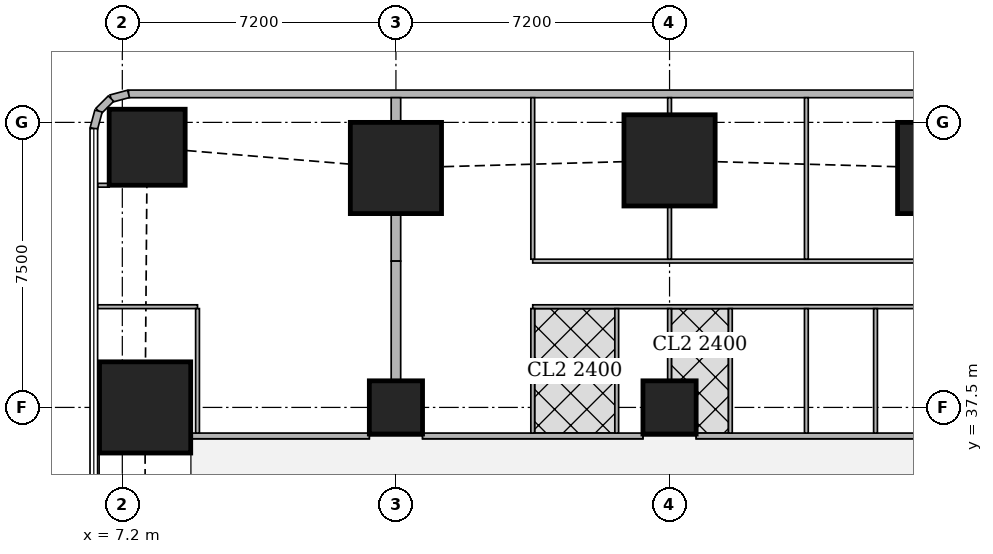
"""IFC4 building model, lengths in metres.
Left out: names, types, materials, properties, quantities, classifications, styles, units other than length and angle.
Written with IfcOpenShell. Run it as: python <this file> out.ifc"""

import sys

from ifc_helpers import new_model, si_unit, direction, frame, frame_2d, origin, origin_2d, place, context, subcontext, project, spatial, rectangle, extrude, element, fill, save


model = new_model("IFC4")
c1 = context("Model", 3, precision=1e-05, world=origin(), true_north=direction((0.0, 1.0)))
c2 = subcontext(c1, "Body", "Model", "MODEL_VIEW")
j1 = project(units=[si_unit("LENGTHUNIT", "METRE"), si_unit("PLANEANGLEUNIT", "RADIAN")], contexts=[c1])
p1 = place(None, origin())
s1 = spatial("IfcSite", under=j1, at=p1, CompositionType="ELEMENT")
p2 = place(p1, origin())
s2 = spatial("IfcBuilding", under=s1, at=p2, CompositionType="ELEMENT")
p3 = place(p2, frame((0.0, 0.0, 193.7)))
s3 = spatial("IfcBuildingStorey", under=s2, at=p3, CompositionType="ELEMENT", Elevation=193.7)
p4 = place(p3, frame((7.8, 37.5, 0.0), z_axis=(0.0, 0.0, 1.0), x_axis=(1.0, 0.0, 0.0)))
e1 = element("IfcColumn", 1, at=p4, inside=s3, PredefinedType="COLUMN", context=c2, shape_type="SweptSolid", body=[
    extrude(rectangle(XDim=2.4, YDim=2.4, at=origin_2d()), origin(), (0.0, 0.0, 1.0), 3.75),
])
for number, where, z_axis, x_axis in (
    (2, (14.4, 37.5, 0.0), (0.0, 0.0, 1.0), (1.0, 0.0, 0.0)),
    (3, (21.6, 37.5, 0.0), (0.0, 0.0, 1.0), (1.0, 0.0, 0.0)),
):
    element("IfcColumn", number, at=place(p3, frame(where, z_axis=z_axis, x_axis=x_axis)), inside=s3, PredefinedType="COLUMN", context=c2, shape_type="SweptSolid", body=[
        extrude(rectangle(XDim=1.4, YDim=1.4, at=origin_2d()), origin(), (0.0, 0.0, 1.0), 3.75),
    ])
p5 = place(p3, frame((7.854, 44.346, 0.0), z_axis=(0.0, 0.0, 1.0), x_axis=(1.0, 0.0, 0.0)))
e4 = element("IfcColumn", 4, at=p5, inside=s3, PredefinedType="COLUMN", context=c2, shape_type="SweptSolid", body=[
    extrude(rectangle(XDim=2.0, YDim=2.0, at=origin_2d()), origin(), (0.0, 0.0, 1.0), 3.75),
])
for number, where, z_axis, x_axis in (
    (5, (14.4, 43.8, 0.0), (0.0, 0.0, 1.0), (1.0, 0.0, 0.0)),
    (6, (21.6, 44.0, 0.0), (0.0, 0.0, 1.0), (1.0, 0.0, 0.0)),
    (7, (28.8, 43.8, 0.0), (0.0, 0.0, 1.0), (1.0, 0.0, 0.0)),
):
    element("IfcColumn", number, at=place(p3, frame(where, z_axis=z_axis, x_axis=x_axis)), inside=s3, PredefinedType="COLUMN", context=c2, shape_type="SweptSolid", body=[
        extrude(rectangle(XDim=2.4, YDim=2.4, at=origin_2d()), origin(), (0.0, 0.0, 1.0), 3.75),
    ])
p6 = place(p3, frame((40.106, 45.75, 0.0), z_axis=(0.0, 0.0, 1.0), x_axis=(-1.0, 0.0, 0.0)))
e8 = element("IfcWall", 8, at=p6, inside=s3, PredefinedType="SOLIDWALL", context=c2, shape_type="SweptSolid", body=[
    extrude(rectangle(XDim=32.743, YDim=0.2, at=frame_2d((16.372, 0.0))), origin(), (0.0, 0.0, 1.0), 3.5),
])
p7 = place(p6, frame((8.606, 0.0, 0.9)))
e9 = element("IfcOpeningElement", 9, at=p7, cuts=e8, PredefinedType="OPENING", context=c2, shape_type="SweptSolid", body=[
    extrude(rectangle(XDim=1.8, YDim=1.5, at=frame_2d((0.9, 0.75))), frame((0.0, 0.11, 0.0), z_axis=(0.0, -1.0, 0.0), x_axis=(1.0, 0.0, 0.0)), (0.0, 0.0, 1.0), 0.22),
])
p8 = place(p6, frame((12.206, 0.0, 0.9)))
e10 = element("IfcOpeningElement", 10, at=p8, cuts=e8, PredefinedType="OPENING", context=c2, shape_type="SweptSolid", body=[
    extrude(rectangle(XDim=1.8, YDim=1.5, at=frame_2d((0.9, 0.75))), frame((0.0, 0.11, 0.0), z_axis=(0.0, -1.0, 0.0), x_axis=(1.0, 0.0, 0.0)), (0.0, 0.0, 1.0), 0.22),
])
p9 = place(p6, frame((15.806, 0.0, 0.9)))
e11 = element("IfcOpeningElement", 11, at=p9, cuts=e8, PredefinedType="OPENING", context=c2, shape_type="SweptSolid", body=[
    extrude(rectangle(XDim=1.8, YDim=1.5, at=frame_2d((0.9, 0.75))), frame((0.0, 0.11, 0.0), z_axis=(0.0, -1.0, 0.0), x_axis=(1.0, 0.0, 0.0)), (0.0, 0.0, 1.0), 0.22),
])
p10 = place(p6, frame((19.406, 0.0, 0.9)))
e12 = element("IfcOpeningElement", 12, at=p10, cuts=e8, PredefinedType="OPENING", context=c2, shape_type="SweptSolid", body=[
    extrude(rectangle(XDim=1.8, YDim=1.5, at=frame_2d((0.9, 0.75))), frame((0.0, 0.11, 0.0), z_axis=(0.0, -1.0, 0.0), x_axis=(1.0, 0.0, 0.0)), (0.0, 0.0, 1.0), 0.22),
])
p11 = place(p6, frame((23.006, 0.0, 0.9)))
e13 = element("IfcOpeningElement", 13, at=p11, cuts=e8, PredefinedType="OPENING", context=c2, shape_type="SweptSolid", body=[
    extrude(rectangle(XDim=1.8, YDim=1.5, at=frame_2d((0.9, 0.75))), frame((0.0, 0.11, 0.0), z_axis=(0.0, -1.0, 0.0), x_axis=(1.0, 0.0, 0.0)), (0.0, 0.0, 1.0), 0.22),
])
p12 = place(p6, frame((28.025, 0.0, 0.9)))
e14 = element("IfcOpeningElement", 14, at=p12, cuts=e8, PredefinedType="OPENING", context=c2, shape_type="SweptSolid", body=[
    extrude(rectangle(XDim=2.4, YDim=1.5, at=frame_2d((1.2, 0.75))), frame((0.0, 0.11, 0.0), z_axis=(0.0, -1.0, 0.0), x_axis=(1.0, 0.0, 0.0)), (0.0, 0.0, 1.0), 0.22),
])
p13 = place(p3, frame((7.363, 45.75, 0.0), z_axis=(0.0, 0.0, 1.0), x_axis=(-0.965655254015, -0.259826731483, 0.0)))
e15 = element("IfcWall", 15, at=p13, inside=s3, PredefinedType="SOLIDWALL", context=c2, shape_type="SweptSolid", body=[
    extrude(rectangle(XDim=0.477, YDim=0.2, at=frame_2d((0.239, 0.0))), origin(), (0.0, 0.0, 1.0), 3.5),
])
p14 = place(p3, frame((6.902, 45.626, 0.0), z_axis=(0.0, 0.0, 1.0), x_axis=(-0.707369890659, -0.706843573776, 0.0)))
e16 = element("IfcWall", 16, at=p14, inside=s3, PredefinedType="SOLIDWALL", context=c2, shape_type="SweptSolid", body=[
    extrude(rectangle(XDim=0.464, YDim=0.2, at=frame_2d((0.232, 0.0))), origin(), (0.0, 0.0, 1.0), 3.5),
])
p15 = place(p3, frame((6.574, 45.298, 0.0), z_axis=(0.0, 0.0, 1.0), x_axis=(-0.259698463175, -0.965689757751, 0.0)))
e17 = element("IfcWall", 17, at=p15, inside=s3, PredefinedType="SOLIDWALL", context=c2, shape_type="SweptSolid", body=[
    extrude(rectangle(XDim=0.478, YDim=0.2, at=frame_2d((0.239, 0.0))), origin(), (0.0, 0.0, 1.0), 3.5),
])
p16 = place(p3, frame((9.001, 36.75, 0.0), z_axis=(0.0, 0.0, 1.0), x_axis=(1.0, 0.0, 0.0)))
e18 = element("IfcWall", 18, at=p16, inside=s3, PredefinedType="SOLIDWALL", context=c2, shape_type="SweptSolid", body=[
    extrude(rectangle(XDim=4.698, YDim=0.15, at=frame_2d((2.349, 0.0))), origin(), (0.0, 0.0, 1.0), 3.5),
])
p17 = place(p16, frame((0.353, 0.0, 0.0)))
e19 = element("IfcOpeningElement", 19, at=p17, cuts=e18, PredefinedType="OPENING", context=c2, shape_type="SweptSolid", body=[
    extrude(rectangle(XDim=1.0, YDim=2.1, at=frame_2d((0.5, 1.05))), frame((0.0, 0.085, 0.0), z_axis=(0.0, -1.0, 0.0), x_axis=(1.0, 0.0, 0.0)), (0.0, 0.0, 1.0), 0.17),
])
p18 = place(p3, frame((15.101, 36.75, 0.0), z_axis=(0.0, 0.0, 1.0), x_axis=(1.0, 0.0, 0.0)))
e20 = element("IfcWall", 20, at=p18, inside=s3, PredefinedType="SOLIDWALL", context=c2, shape_type="SweptSolid", body=[
    extrude(rectangle(XDim=5.798, YDim=0.15, at=frame_2d((2.899, 0.0))), origin(), (0.0, 0.0, 1.0), 3.5),
])
p19 = place(p18, frame((0.799, 0.0, 0.0)))
e21 = element("IfcOpeningElement", 21, at=p19, cuts=e20, PredefinedType="OPENING", context=c2, shape_type="SweptSolid", body=[
    extrude(rectangle(XDim=1.0, YDim=2.1, at=frame_2d((0.5, 1.05))), frame((0.0, 0.085, 0.0), z_axis=(0.0, -1.0, 0.0), x_axis=(1.0, 0.0, 0.0)), (0.0, 0.0, 1.0), 0.17),
])
p20 = place(p3, frame((22.301, 36.75, 0.0), z_axis=(0.0, 0.0, 1.0), x_axis=(1.0, 0.0, 0.0)))
e22 = element("IfcWall", 22, at=p20, inside=s3, PredefinedType="SOLIDWALL", context=c2, shape_type="SweptSolid", body=[
    extrude(rectangle(XDim=5.798, YDim=0.15, at=frame_2d((2.899, 0.0))), origin(), (0.0, 0.0, 1.0), 3.5),
])
p21 = place(p3, frame((6.854, 43.346, 0.0), z_axis=(0.0, 0.0, 1.0), x_axis=(-1.0, 0.0, 0.0)))
e23 = element("IfcWall", 23, at=p21, inside=s3, PredefinedType="PARTITIONING", context=c2, shape_type="SweptSolid", body=[
    extrude(rectangle(XDim=0.304, YDim=0.1, at=frame_2d((0.152, 0.0))), origin(), (0.0, 0.0, 1.0), 2.05),
])
p22 = place(p3, frame((6.55, 40.15, 0.0), z_axis=(0.0, 0.0, 1.0), x_axis=(1.0, 0.0, 0.0)))
e24 = element("IfcWall", 24, at=p22, inside=s3, PredefinedType="PARTITIONING", context=c2, shape_type="SweptSolid", body=[
    extrude(rectangle(XDim=2.629, YDim=0.1, at=frame_2d((1.314, 0.0))), origin(), (0.0, 0.0, 1.0), 2.05),
])
p23 = place(p3, frame((9.179, 36.825, 0.0), z_axis=(0.0, 0.0, 1.0), x_axis=(0.0, 1.0, 0.0)))
e25 = element("IfcWall", 25, at=p23, inside=s3, PredefinedType="PARTITIONING", context=c2, shape_type="SweptSolid", body=[
    extrude(rectangle(XDim=3.275, YDim=0.1, at=frame_2d((1.638, 0.0))), origin(), (0.0, 0.0, 1.0), 3.5),
])
p24 = place(p23, frame((2.225, 0.0, 0.0)))
e26 = element("IfcOpeningElement", 26, at=p24, cuts=e25, PredefinedType="OPENING", context=c2, shape_type="SweptSolid", body=[
    extrude(rectangle(XDim=0.9, YDim=2.1, at=frame_2d((0.45, 1.05))), frame((0.0, 0.06, 0.0), z_axis=(0.0, -1.0, 0.0), x_axis=(1.0, 0.0, 0.0)), (0.0, 0.0, 1.0), 0.12),
])
p25 = place(p3, frame((18.0, 41.35, 0.0), z_axis=(0.0, 0.0, 1.0), x_axis=(1.0, 0.0, 0.0)))
e27 = element("IfcWall", 27, at=p25, inside=s3, PredefinedType="PARTITIONING", context=c2, shape_type="SweptSolid", body=[
    extrude(rectangle(XDim=10.675, YDim=0.1, at=frame_2d((5.337, 0.0))), origin(), (0.0, 0.0, 1.0), 3.5),
])
p26 = place(p25, frame((0.2, 0.0, 0.0)))
e28 = element("IfcOpeningElement", 28, at=p26, cuts=e27, PredefinedType="OPENING", context=c2, shape_type="SweptSolid", body=[
    extrude(rectangle(XDim=0.9, YDim=2.1, at=frame_2d((0.45, 1.05))), frame((0.0, 0.06, 0.0), z_axis=(0.0, -1.0, 0.0), x_axis=(1.0, 0.0, 0.0)), (0.0, 0.0, 1.0), 0.12),
])
p27 = place(p25, frame((3.8, 0.0, 0.0)))
e29 = element("IfcOpeningElement", 29, at=p27, cuts=e27, PredefinedType="OPENING", context=c2, shape_type="SweptSolid", body=[
    extrude(rectangle(XDim=0.9, YDim=2.1, at=frame_2d((0.45, 1.05))), frame((0.0, 0.06, 0.0), z_axis=(0.0, -1.0, 0.0), x_axis=(1.0, 0.0, 0.0)), (0.0, 0.0, 1.0), 0.12),
])
p28 = place(p25, frame((7.4, 0.0, 0.0)))
e30 = element("IfcOpeningElement", 30, at=p28, cuts=e27, PredefinedType="OPENING", context=c2, shape_type="SweptSolid", body=[
    extrude(rectangle(XDim=0.9, YDim=2.1, at=frame_2d((0.45, 1.05))), frame((0.0, 0.06, 0.0), z_axis=(0.0, -1.0, 0.0), x_axis=(1.0, 0.0, 0.0)), (0.0, 0.0, 1.0), 0.12),
])
p29 = place(p3, frame((18.0, 40.15, 0.0), z_axis=(0.0, 0.0, 1.0), x_axis=(1.0, 0.0, 0.0)))
e31 = element("IfcWall", 31, at=p29, inside=s3, PredefinedType="PARTITIONING", context=c2, shape_type="SweptSolid", body=[
    extrude(rectangle(XDim=10.675, YDim=0.1, at=frame_2d((5.337, 0.0))), origin(), (0.0, 0.0, 1.0), 3.5),
])
p30 = place(p29, frame((0.655, 0.0, 0.0)))
e32 = element("IfcOpeningElement", 32, at=p30, cuts=e31, PredefinedType="OPENING", context=c2, shape_type="SweptSolid", body=[
    extrude(rectangle(XDim=0.9, YDim=2.1, at=frame_2d((0.45, 1.05))), frame((0.0, 0.06, 0.0), z_axis=(0.0, -1.0, 0.0), x_axis=(1.0, 0.0, 0.0)), (0.0, 0.0, 1.0), 0.12),
])
p31 = place(p29, frame((3.95, 0.0, 0.0)))
e33 = element("IfcOpeningElement", 33, at=p31, cuts=e31, PredefinedType="OPENING", context=c2, shape_type="SweptSolid", body=[
    extrude(rectangle(XDim=0.9, YDim=2.1, at=frame_2d((0.45, 1.05))), frame((0.0, 0.06, 0.0), z_axis=(0.0, -1.0, 0.0), x_axis=(1.0, 0.0, 0.0)), (0.0, 0.0, 1.0), 0.12),
])
p32 = place(p29, frame((7.66, 0.0, 0.0)))
e34 = element("IfcOpeningElement", 34, at=p32, cuts=e31, PredefinedType="OPENING", context=c2, shape_type="SweptSolid", body=[
    extrude(rectangle(XDim=0.9, YDim=2.1, at=frame_2d((0.45, 1.05))), frame((0.0, 0.06, 0.0), z_axis=(0.0, -1.0, 0.0), x_axis=(1.0, 0.0, 0.0)), (0.0, 0.0, 1.0), 0.12),
])
p33 = place(p29, frame((2.455, 0.0, 0.0)))
e35 = element("IfcOpeningElement", 35, at=p33, cuts=e31, PredefinedType="OPENING", context=c2, shape_type="SweptSolid", body=[
    extrude(rectangle(XDim=0.9, YDim=2.1, at=frame_2d((0.45, 1.05))), frame((0.0, 0.06, 0.0), z_axis=(0.0, -1.0, 0.0), x_axis=(1.0, 0.0, 0.0)), (0.0, 0.0, 1.0), 0.12),
])
p34 = place(p29, frame((5.75, 0.0, 0.0)))
e36 = element("IfcOpeningElement", 36, at=p34, cuts=e31, PredefinedType="OPENING", context=c2, shape_type="SweptSolid", body=[
    extrude(rectangle(XDim=0.9, YDim=2.1, at=frame_2d((0.45, 1.05))), frame((0.0, 0.06, 0.0), z_axis=(0.0, -1.0, 0.0), x_axis=(1.0, 0.0, 0.0)), (0.0, 0.0, 1.0), 0.12),
])
p35 = place(p29, frame((9.46, 0.0, 0.0)))
e37 = element("IfcOpeningElement", 37, at=p35, cuts=e31, PredefinedType="OPENING", context=c2, shape_type="SweptSolid", body=[
    extrude(rectangle(XDim=0.9, YDim=2.1, at=frame_2d((0.45, 1.05))), frame((0.0, 0.06, 0.0), z_axis=(0.0, -1.0, 0.0), x_axis=(1.0, 0.0, 0.0)), (0.0, 0.0, 1.0), 0.12),
])
p36 = place(p3, frame((18.0, 41.4, 0.0), z_axis=(0.0, 0.0, 1.0), x_axis=(0.0, 1.0, 0.0)))
e38 = element("IfcWall", 38, at=p36, inside=s3, PredefinedType="PARTITIONING", context=c2, shape_type="SweptSolid", body=[
    extrude(rectangle(XDim=4.25, YDim=0.1, at=frame_2d((2.125, 0.0))), origin(), (0.0, 0.0, 1.0), 2.05),
])
p37 = place(p3, frame((21.6, 41.4, 0.0), z_axis=(0.0, 0.0, 1.0), x_axis=(0.0, 1.0, 0.0)))
e39 = element("IfcWall", 39, at=p37, inside=s3, PredefinedType="PARTITIONING", context=c2, shape_type="SweptSolid", body=[
    extrude(rectangle(XDim=1.399, YDim=0.1, at=frame_2d((0.7, 0.0))), origin(), (0.0, 0.0, 1.0), 3.5),
])
p38 = place(p3, frame((21.6, 45.201, 0.0), z_axis=(0.0, 0.0, 1.0), x_axis=(0.0, 1.0, 0.0)))
e40 = element("IfcWall", 40, at=p38, inside=s3, PredefinedType="PARTITIONING", context=c2, shape_type="SweptSolid", body=[
    extrude(rectangle(XDim=0.449, YDim=0.1, at=frame_2d((0.225, 0.0))), origin(), (0.0, 0.0, 1.0), 3.5),
])
p39 = place(p3, frame((25.2, 41.4, 0.0), z_axis=(0.0, 0.0, 1.0), x_axis=(0.0, 1.0, 0.0)))
e41 = element("IfcWall", 41, at=p39, inside=s3, PredefinedType="PARTITIONING", context=c2, shape_type="SweptSolid", body=[
    extrude(rectangle(XDim=4.25, YDim=0.1, at=frame_2d((2.125, 0.0))), origin(), (0.0, 0.0, 1.0), 2.05),
])
p40 = place(p3, frame((18.0, 36.825, 0.0), z_axis=(0.0, 0.0, 1.0), x_axis=(0.0, 1.0, 0.0)))
e42 = element("IfcWall", 42, at=p40, inside=s3, PredefinedType="PARTITIONING", context=c2, shape_type="SweptSolid", body=[
    extrude(rectangle(XDim=3.275, YDim=0.1, at=frame_2d((1.638, 0.0))), origin(), (0.0, 0.0, 1.0), 3.5),
])
p41 = place(p3, frame((21.6, 38.201, 0.0), z_axis=(0.0, 0.0, 1.0), x_axis=(0.0, 1.0, 0.0)))
e43 = element("IfcWall", 43, at=p41, inside=s3, PredefinedType="PARTITIONING", context=c2, shape_type="SweptSolid", body=[
    extrude(rectangle(XDim=1.899, YDim=0.1, at=frame_2d((0.95, 0.0))), origin(), (0.0, 0.0, 1.0), 3.5),
])
for number, where, z_axis, x_axis in (
    (44, (25.2, 36.825, 0.0), (0.0, 0.0, 1.0), (0.0, 1.0, 0.0)),
    (45, (20.21, 36.825, 0.0), (0.0, 0.0, 1.0), (0.0, 1.0, 0.0)),
    (46, (23.2, 36.825, 0.0), (0.0, 0.0, 1.0), (0.0, 1.0, 0.0)),
    (47, (27.02, 36.825, 0.0), (0.0, 0.0, 1.0), (0.0, 1.0, 0.0)),
):
    element("IfcWall", number, at=place(p3, frame(where, z_axis=z_axis, x_axis=x_axis)), inside=s3, PredefinedType="PARTITIONING", context=c2, shape_type="SweptSolid", body=[
        extrude(rectangle(XDim=3.275, YDim=0.1, at=frame_2d((1.638, 0.0))), origin(), (0.0, 0.0, 1.0), 3.5),
    ])
p42 = place(p3, frame((14.4, 41.35, 0.0), z_axis=(0.0, 0.0, 1.0), x_axis=(0.0, 1.0, 0.0)))
e48 = element("IfcWall", 48, at=p42, inside=s3, PredefinedType="SOLIDWALL", context=c2, shape_type="SweptSolid", body=[
    extrude(rectangle(XDim=1.249, YDim=0.25, at=frame_2d((0.625, 0.0))), origin(), (0.0, 0.0, 1.0), 2.05),
])
p43 = place(p3, frame((14.4, 45.001, 0.0), z_axis=(0.0, 0.0, 1.0), x_axis=(0.0, 1.0, 0.0)))
e49 = element("IfcWall", 49, at=p43, inside=s3, PredefinedType="SOLIDWALL", context=c2, shape_type="SweptSolid", body=[
    extrude(rectangle(XDim=0.649, YDim=0.25, at=frame_2d((0.324, 0.0))), origin(), (0.0, 0.0, 1.0), 2.05),
])
p44 = place(p3, frame((14.4, 38.201, 0.0), z_axis=(0.0, 0.0, 1.0), x_axis=(0.0, 1.0, 0.0)))
e50 = element("IfcWall", 50, at=p44, inside=s3, PredefinedType="SOLIDWALL", context=c2, shape_type="SweptSolid", body=[
    extrude(rectangle(XDim=3.149, YDim=0.25, at=frame_2d((1.575, 0.0))), origin(), (0.0, 0.0, 1.0), 3.5),
])
p45 = place(p8, origin())
e51 = element("IfcWindow", 51, at=p45, inside=s3, PartitioningType="SINGLE_PANEL", PredefinedType="WINDOW", context=c2, shape_type="SweptSolid", body=[
    extrude(rectangle(XDim=1.8, YDim=1.5, at=frame_2d((0.9, 0.75))), frame((0.0, 0.03, 0.0), z_axis=(0.0, -1.0, 0.0), x_axis=(1.0, 0.0, 0.0)), (0.0, 0.0, 1.0), 0.06),
])
fill(e10, e51)
p46 = place(p9, origin())
e52 = element("IfcWindow", 52, at=p46, inside=s3, PartitioningType="SINGLE_PANEL", PredefinedType="WINDOW", context=c2, shape_type="SweptSolid", body=[
    extrude(rectangle(XDim=1.8, YDim=1.5, at=frame_2d((0.9, 0.75))), frame((0.0, 0.03, 0.0), z_axis=(0.0, -1.0, 0.0), x_axis=(1.0, 0.0, 0.0)), (0.0, 0.0, 1.0), 0.06),
])
fill(e11, e52)
p47 = place(p10, origin())
e53 = element("IfcWindow", 53, at=p47, inside=s3, PartitioningType="SINGLE_PANEL", PredefinedType="WINDOW", context=c2, shape_type="SweptSolid", body=[
    extrude(rectangle(XDim=1.8, YDim=1.5, at=frame_2d((0.9, 0.75))), frame((0.0, 0.03, 0.0), z_axis=(0.0, -1.0, 0.0), x_axis=(1.0, 0.0, 0.0)), (0.0, 0.0, 1.0), 0.06),
])
fill(e12, e53)
p48 = place(p11, origin())
e54 = element("IfcWindow", 54, at=p48, inside=s3, PartitioningType="SINGLE_PANEL", PredefinedType="WINDOW", context=c2, shape_type="SweptSolid", body=[
    extrude(rectangle(XDim=1.8, YDim=1.5, at=frame_2d((0.9, 0.75))), frame((0.0, 0.03, 0.0), z_axis=(0.0, -1.0, 0.0), x_axis=(1.0, 0.0, 0.0)), (0.0, 0.0, 1.0), 0.06),
])
fill(e13, e54)
p49 = place(p12, origin())
e55 = element("IfcWindow", 55, at=p49, inside=s3, PartitioningType="SINGLE_PANEL", PredefinedType="WINDOW", context=c2, shape_type="SweptSolid", body=[
    extrude(rectangle(XDim=2.4, YDim=1.5, at=frame_2d((1.2, 0.75))), frame((0.0, 0.03, 0.0), z_axis=(0.0, -1.0, 0.0), x_axis=(1.0, 0.0, 0.0)), (0.0, 0.0, 1.0), 0.06),
])
fill(e14, e55)
p50 = place(p24, origin())
e56 = element("IfcDoor", 56, at=p50, inside=s3, OperationType="SINGLE_SWING_RIGHT", PredefinedType="DOOR", context=c2, shape_type="SweptSolid", body=[
    extrude(rectangle(XDim=0.9, YDim=2.1, at=frame_2d((0.45, 1.05))), frame((0.0, 0.025, 0.0), z_axis=(0.0, -1.0, 0.0), x_axis=(1.0, 0.0, 0.0)), (0.0, 0.0, 1.0), 0.05),
])
fill(e26, e56)
p51 = place(p17, origin())
e57 = element("IfcDoor", 57, at=p51, inside=s3, OperationType="SINGLE_SWING_RIGHT", PredefinedType="DOOR", context=c2, shape_type="SweptSolid", body=[
    extrude(rectangle(XDim=1.0, YDim=2.1, at=frame_2d((0.5, 1.05))), frame((0.0, 0.025, 0.0), z_axis=(0.0, -1.0, 0.0), x_axis=(1.0, 0.0, 0.0)), (0.0, 0.0, 1.0), 0.05),
])
fill(e19, e57)
p52 = place(p26, origin())
e58 = element("IfcDoor", 58, at=p52, inside=s3, OperationType="SINGLE_SWING_LEFT", PredefinedType="DOOR", context=c2, shape_type="SweptSolid", body=[
    extrude(rectangle(XDim=0.9, YDim=2.1, at=frame_2d((0.45, 1.05))), frame((0.0, 0.025, 0.0), z_axis=(0.0, -1.0, 0.0), x_axis=(1.0, 0.0, 0.0)), (0.0, 0.0, 1.0), 0.05),
])
fill(e28, e58)
p53 = place(p27, origin())
e59 = element("IfcDoor", 59, at=p53, inside=s3, OperationType="SINGLE_SWING_LEFT", PredefinedType="DOOR", context=c2, shape_type="SweptSolid", body=[
    extrude(rectangle(XDim=0.9, YDim=2.1, at=frame_2d((0.45, 1.05))), frame((0.0, 0.025, 0.0), z_axis=(0.0, -1.0, 0.0), x_axis=(1.0, 0.0, 0.0)), (0.0, 0.0, 1.0), 0.05),
])
fill(e29, e59)
p54 = place(p28, origin())
e60 = element("IfcDoor", 60, at=p54, inside=s3, OperationType="SINGLE_SWING_LEFT", PredefinedType="DOOR", context=c2, shape_type="SweptSolid", body=[
    extrude(rectangle(XDim=0.9, YDim=2.1, at=frame_2d((0.45, 1.05))), frame((0.0, 0.025, 0.0), z_axis=(0.0, -1.0, 0.0), x_axis=(1.0, 0.0, 0.0)), (0.0, 0.0, 1.0), 0.05),
])
fill(e30, e60)
p55 = place(p30, origin())
e61 = element("IfcDoor", 61, at=p55, inside=s3, OperationType="SINGLE_SWING_RIGHT", PredefinedType="DOOR", context=c2, shape_type="SweptSolid", body=[
    extrude(rectangle(XDim=0.9, YDim=2.1, at=frame_2d((0.45, 1.05))), frame((0.0, 0.025, 0.0), z_axis=(0.0, -1.0, 0.0), x_axis=(1.0, 0.0, 0.0)), (0.0, 0.0, 1.0), 0.05),
])
fill(e32, e61)
p56 = place(p31, origin())
e62 = element("IfcDoor", 62, at=p56, inside=s3, OperationType="SINGLE_SWING_RIGHT", PredefinedType="DOOR", context=c2, shape_type="SweptSolid", body=[
    extrude(rectangle(XDim=0.9, YDim=2.1, at=frame_2d((0.45, 1.05))), frame((0.0, 0.025, 0.0), z_axis=(0.0, -1.0, 0.0), x_axis=(1.0, 0.0, 0.0)), (0.0, 0.0, 1.0), 0.05),
])
fill(e33, e62)
p57 = place(p32, origin())
e63 = element("IfcDoor", 63, at=p57, inside=s3, OperationType="SINGLE_SWING_RIGHT", PredefinedType="DOOR", context=c2, shape_type="SweptSolid", body=[
    extrude(rectangle(XDim=0.9, YDim=2.1, at=frame_2d((0.45, 1.05))), frame((0.0, 0.025, 0.0), z_axis=(0.0, -1.0, 0.0), x_axis=(1.0, 0.0, 0.0)), (0.0, 0.0, 1.0), 0.05),
])
fill(e34, e63)
p58 = place(p33, origin())
e64 = element("IfcDoor", 64, at=p58, inside=s3, OperationType="SINGLE_SWING_LEFT", PredefinedType="DOOR", context=c2, shape_type="SweptSolid", body=[
    extrude(rectangle(XDim=0.9, YDim=2.1, at=frame_2d((0.45, 1.05))), frame((0.0, 0.025, 0.0), z_axis=(0.0, -1.0, 0.0), x_axis=(1.0, 0.0, 0.0)), (0.0, 0.0, 1.0), 0.05),
])
fill(e35, e64)
p59 = place(p34, origin())
e65 = element("IfcDoor", 65, at=p59, inside=s3, OperationType="SINGLE_SWING_LEFT", PredefinedType="DOOR", context=c2, shape_type="SweptSolid", body=[
    extrude(rectangle(XDim=0.9, YDim=2.1, at=frame_2d((0.45, 1.05))), frame((0.0, 0.025, 0.0), z_axis=(0.0, -1.0, 0.0), x_axis=(1.0, 0.0, 0.0)), (0.0, 0.0, 1.0), 0.05),
])
fill(e36, e65)
p60 = place(p35, origin())
e66 = element("IfcDoor", 66, at=p60, inside=s3, OperationType="SINGLE_SWING_LEFT", PredefinedType="DOOR", context=c2, shape_type="SweptSolid", body=[
    extrude(rectangle(XDim=0.9, YDim=2.1, at=frame_2d((0.45, 1.05))), frame((0.0, 0.025, 0.0), z_axis=(0.0, -1.0, 0.0), x_axis=(1.0, 0.0, 0.0)), (0.0, 0.0, 1.0), 0.05),
])
fill(e37, e66)
p61 = place(p19, origin())
e67 = element("IfcDoor", 67, at=p61, inside=s3, OperationType="SINGLE_SWING_LEFT", PredefinedType="DOOR", context=c2, shape_type="SweptSolid", body=[
    extrude(rectangle(XDim=1.0, YDim=2.1, at=frame_2d((0.5, 1.05))), frame((0.0, 0.025, 0.0), z_axis=(0.0, -1.0, 0.0), x_axis=(1.0, 0.0, 0.0)), (0.0, 0.0, 1.0), 0.05),
])
fill(e21, e67)
save(model, sys.argv[1])
